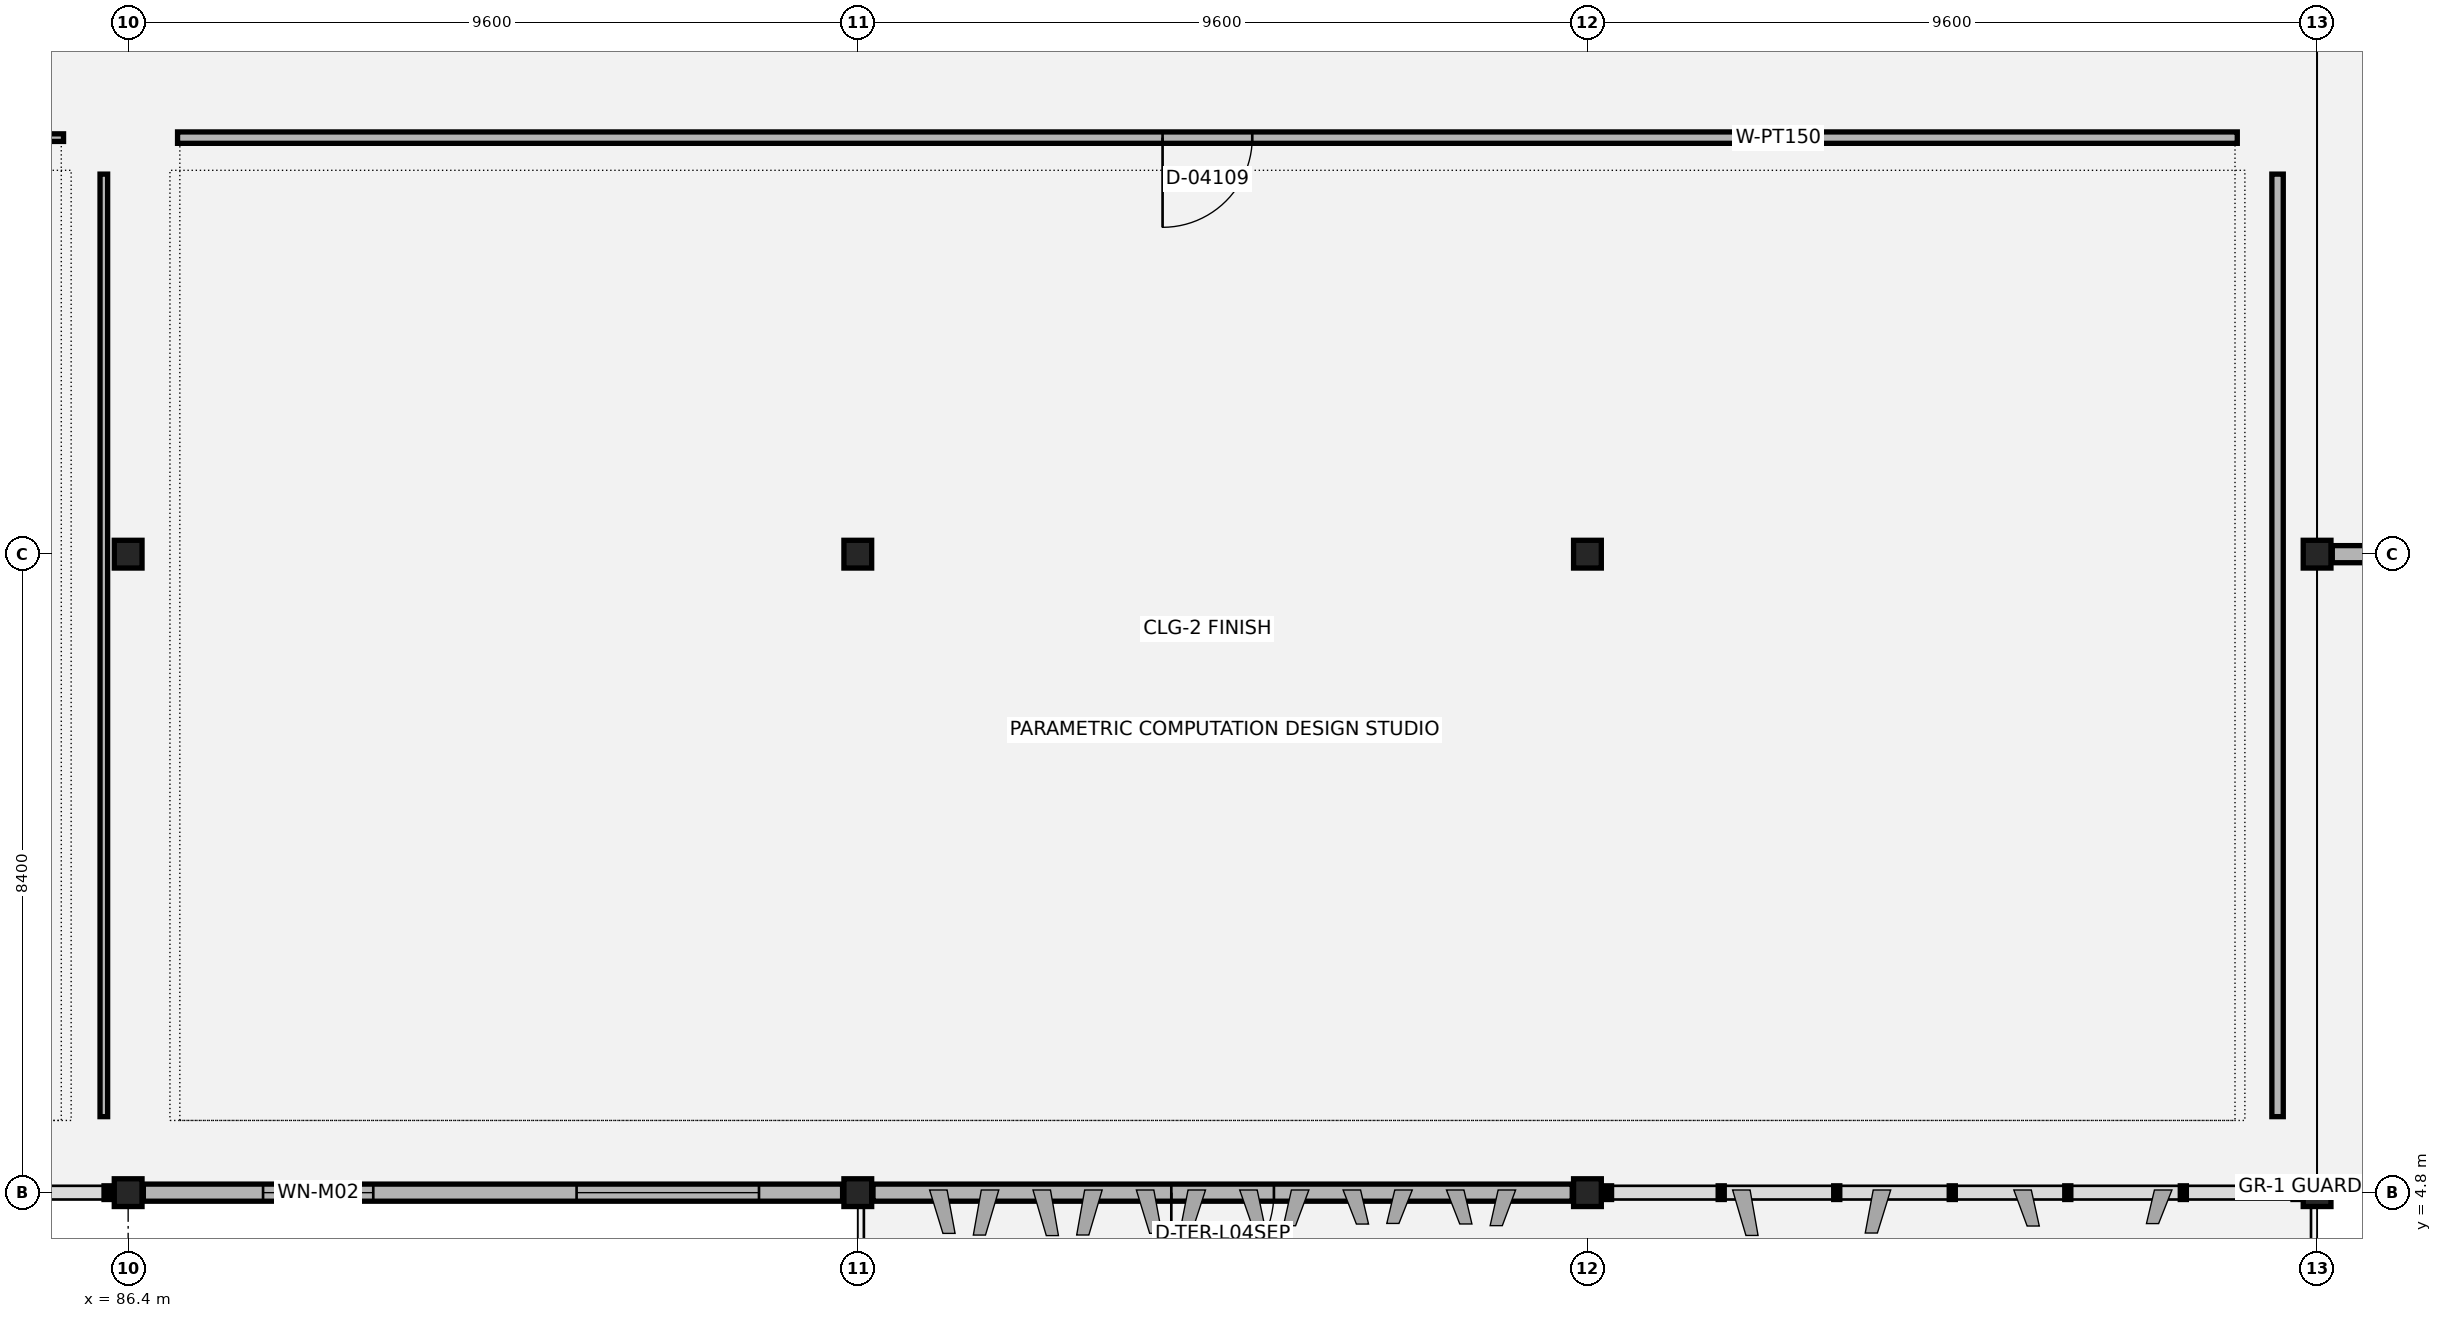
"""IFC4 building model, lengths in metres.
Left out: names, types, materials, properties, quantities, classifications, styles, units other than length and angle.
Written with IfcOpenShell. Run it as: python <this file> out.ifc"""

import sys

from ifc_helpers import new_model, si_unit, direction, frame, frame_2d, origin, origin_2d, place, context, subcontext, project, spatial, rectangle, extrude, element, fill, save


model = new_model("IFC4")
c1 = context("Model", 3, precision=1e-05, world=origin(), true_north=direction((0.0, 1.0)))
c2 = subcontext(c1, "Body", "Model", "MODEL_VIEW")
j1 = project(units=[si_unit("LENGTHUNIT", "METRE"), si_unit("PLANEANGLEUNIT", "RADIAN")], contexts=[c1])
p1 = place(None, origin())
s1 = spatial("IfcSite", under=j1, at=p1, CompositionType="ELEMENT")
p2 = place(p1, origin())
s2 = spatial("IfcBuilding", under=s1, at=p2, CompositionType="ELEMENT")
p3 = place(p2, frame((0.0, 0.0, 18.6)))
s3 = spatial("IfcBuildingStorey", under=s2, at=p3, CompositionType="ELEMENT", Elevation=18.6)
for number, where, z_axis, x_axis in (
    (1, (86.4, 4.8, 0.0), (0.0, 0.0, 1.0), (1.0, 0.0, 0.0)),
    (2, (86.4, 13.2, 0.0), (0.0, 0.0, 1.0), (1.0, 0.0, 0.0)),
    (3, (96.0, 4.8, 0.0), (0.0, 0.0, 1.0), (1.0, 0.0, 0.0)),
    (4, (96.0, 13.2, 0.0), (0.0, 0.0, 1.0), (1.0, 0.0, 0.0)),
    (5, (105.6, 4.8, 0.0), (0.0, 0.0, 1.0), (1.0, 0.0, 0.0)),
    (6, (105.6, 13.2, 0.0), (0.0, 0.0, 1.0), (1.0, 0.0, 0.0)),
    (7, (115.2, 4.8, 0.0), (0.0, 0.0, 1.0), (1.0, 0.0, 0.0)),
    (8, (115.2, 13.2, 0.0), (0.0, 0.0, 1.0), (1.0, 0.0, 0.0)),
):
    element("IfcColumn", number, at=place(p3, frame(where, z_axis=z_axis, x_axis=x_axis)), inside=s3, PredefinedType="COLUMN", context=c2, shape_type="SweptSolid", body=[
        extrude(rectangle(XDim=0.365, YDim=0.365, at=origin_2d()), origin(), (0.0, 0.0, 1.0), 4.2),
    ])
p4 = place(p3, frame((86.6, 4.8, 0.0), z_axis=(0.0, 0.0, 1.0), x_axis=(1.0, 0.0, 0.0)))
e9 = element("IfcWall", 9, at=p4, inside=s3, PredefinedType="SOLIDWALL", context=c2, shape_type="SweptSolid", body=[
    extrude(rectangle(XDim=9.2, YDim=0.225, at=frame_2d((4.6, 0.0))), origin(), (0.0, 0.0, 1.0), 3.07),
])
p5 = place(p4, frame((1.575, 0.0, 0.9)))
e10 = element("IfcOpeningElement", 10, at=p5, cuts=e9, PredefinedType="OPENING", context=c2, shape_type="SweptSolid", body=[
    extrude(rectangle(XDim=1.45, YDim=1.45, at=frame_2d((0.725, 0.725))), frame((0.0, 0.123, 0.0), z_axis=(0.0, -1.0, 0.0), x_axis=(1.0, 0.0, 0.0)), (0.0, 0.0, 1.0), 0.245),
])
p6 = place(p4, frame((5.7, 0.0, 0.9)))
e11 = element("IfcOpeningElement", 11, at=p6, cuts=e9, PredefinedType="OPENING", context=c2, shape_type="SweptSolid", body=[
    extrude(rectangle(XDim=2.4, YDim=1.6, at=frame_2d((1.2, 0.8))), frame((0.0, 0.123, 0.0), z_axis=(0.0, -1.0, 0.0), x_axis=(1.0, 0.0, 0.0)), (0.0, 0.0, 1.0), 0.245),
])
p7 = place(p3, frame((96.2, 4.8, 0.0), z_axis=(0.0, 0.0, 1.0), x_axis=(1.0, 0.0, 0.0)))
e12 = element("IfcWall", 12, at=p7, inside=s3, PredefinedType="SOLIDWALL", context=c2, shape_type="SweptSolid", body=[
    extrude(rectangle(XDim=9.2, YDim=0.225, at=frame_2d((4.6, 0.0))), origin(), (0.0, 0.0, 1.0), 3.07),
])
p8 = place(p7, frame((3.925, 0.0, 0.0)))
e13 = element("IfcOpeningElement", 13, at=p8, cuts=e12, PredefinedType="OPENING", context=c2, shape_type="SweptSolid", body=[
    extrude(rectangle(XDim=1.35, YDim=2.15, at=frame_2d((0.675, 1.075))), frame((0.0, 0.123, 0.0), z_axis=(0.0, -1.0, 0.0), x_axis=(1.0, 0.0, 0.0)), (0.0, 0.0, 1.0), 0.245),
])
p9 = place(p3, frame((119.8, 13.2, 0.0), z_axis=(0.0, 0.0, 1.0), x_axis=(-1.0, 0.0, 0.0)))
e14 = element("IfcWall", 14, at=p9, inside=s3, PredefinedType="SOLIDWALL", context=c2, shape_type="SweptSolid", body=[
    extrude(rectangle(XDim=4.4, YDim=0.225, at=frame_2d((2.2, 0.0))), origin(), (0.0, 0.0, 1.0), 3.07),
])
p10 = place(p9, frame((1.6, 0.0, 0.0)))
e15 = element("IfcOpeningElement", 15, at=p10, cuts=e14, PredefinedType="OPENING", context=c2, shape_type="SweptSolid", body=[
    extrude(rectangle(XDim=1.2, YDim=2.15, at=frame_2d((0.6, 1.075))), frame((0.0, 0.123, 0.0), z_axis=(0.0, -1.0, 0.0), x_axis=(1.0, 0.0, 0.0)), (0.0, 0.0, 1.0), 0.245),
])
p11 = place(p3, frame((58.65, 18.68, 0.0), z_axis=(0.0, 0.0, 1.0), x_axis=(1.0, 0.0, 0.0)))
e16 = element("IfcWall", 16, at=p11, inside=s3, PredefinedType="MOVABLE", context=c2, shape_type="SweptSolid", body=[
    extrude(rectangle(XDim=26.9, YDim=0.1, at=frame_2d((13.45, 0.0))), origin(), (0.0, 0.0, 1.0), 3.05),
])
p12 = place(p11, frame((12.89, 0.0, 0.0)))
e17 = element("IfcOpeningElement", 17, at=p12, cuts=e16, PredefinedType="OPENING", context=c2, shape_type="SweptSolid", body=[
    extrude(rectangle(XDim=1.12, YDim=2.15, at=frame_2d((0.56, 1.075))), frame((0.0, 0.06, 0.0), z_axis=(0.0, -1.0, 0.0), x_axis=(1.0, 0.0, 0.0)), (0.0, 0.0, 1.0), 0.12),
])
p13 = place(p3, frame((86.08, 5.8, 0.0), z_axis=(0.0, 0.0, 1.0), x_axis=(0.0, 1.0, 0.0)))
e18 = element("IfcWall", 18, at=p13, inside=s3, PredefinedType="MOVABLE", context=c2, shape_type="SweptSolid", body=[
    extrude(rectangle(XDim=12.4, YDim=0.1, at=frame_2d((6.2, 0.0))), origin(), (0.0, 0.0, 1.0), 3.05),
])
p14 = place(p3, frame((87.05, 18.68, 0.0), z_axis=(0.0, 0.0, 1.0), x_axis=(1.0, 0.0, 0.0)))
e19 = element("IfcWall", 19, at=p14, inside=s3, PredefinedType="PARTITIONING", context=c2, shape_type="SweptSolid", body=[
    extrude(rectangle(XDim=27.1, YDim=0.15, at=frame_2d((13.55, 0.0))), origin(), (0.0, 0.0, 1.0), 3.05),
])
p15 = place(p14, frame((12.96, 0.0, 0.0)))
e20 = element("IfcOpeningElement", 20, at=p15, cuts=e19, PredefinedType="OPENING", context=c2, shape_type="SweptSolid", body=[
    extrude(rectangle(XDim=1.18, YDim=2.15, at=frame_2d((0.59, 1.075))), frame((0.0, 0.085, 0.0), z_axis=(0.0, -1.0, 0.0), x_axis=(1.0, 0.0, 0.0)), (0.0, 0.0, 1.0), 0.17),
])
p16 = place(p3, frame((114.68, 5.8, 0.0), z_axis=(0.0, 0.0, 1.0), x_axis=(0.0, 1.0, 0.0)))
e21 = element("IfcWall", 21, at=p16, inside=s3, PredefinedType="PARTITIONING", context=c2, shape_type="SweptSolid", body=[
    extrude(rectangle(XDim=12.4, YDim=0.15, at=frame_2d((6.2, 0.0))), origin(), (0.0, 0.0, 1.0), 3.05),
])
p17 = place(p5, origin())
e22 = element("IfcWindow", 22, at=p17, inside=s3, PartitioningType="SINGLE_PANEL", PredefinedType="WINDOW", context=c2, shape_type="SweptSolid", body=[
    extrude(rectangle(XDim=1.45, YDim=1.45, at=frame_2d((0.725, 0.725))), frame((0.0, 0.03, 0.0), z_axis=(0.0, -1.0, 0.0), x_axis=(1.0, 0.0, 0.0)), (0.0, 0.0, 1.0), 0.06),
])
fill(e10, e22)
p18 = place(p6, origin())
e23 = element("IfcWindow", 23, at=p18, inside=s3, PartitioningType="SINGLE_PANEL", PredefinedType="WINDOW", context=c2, shape_type="SweptSolid", body=[
    extrude(rectangle(XDim=2.4, YDim=1.6, at=frame_2d((1.2, 0.8))), frame((0.0, 0.03, 0.0), z_axis=(0.0, -1.0, 0.0), x_axis=(1.0, 0.0, 0.0)), (0.0, 0.0, 1.0), 0.06),
])
fill(e11, e23)
p19 = place(p8, origin())
e24 = element("IfcDoor", 24, at=p19, inside=s3, OperationType="SINGLE_SWING_RIGHT", PredefinedType="DOOR", context=c2, shape_type="SweptSolid", body=[
    extrude(rectangle(XDim=1.35, YDim=2.15, at=frame_2d((0.675, 1.075))), frame((0.0, 0.025, 0.0), z_axis=(0.0, -1.0, 0.0), x_axis=(1.0, 0.0, 0.0)), (0.0, 0.0, 1.0), 0.05),
])
fill(e13, e24)
p20 = place(p15, origin())
e25 = element("IfcDoor", 25, at=p20, inside=s3, OperationType="SINGLE_SWING_RIGHT", PredefinedType="DOOR", context=c2, shape_type="SweptSolid", body=[
    extrude(rectangle(XDim=1.18, YDim=2.15, at=frame_2d((0.59, 1.075))), frame((0.0, 0.025, 0.0), z_axis=(0.0, -1.0, 0.0), x_axis=(1.0, 0.0, 0.0)), (0.0, 0.0, 1.0), 0.05),
])
fill(e20, e25)
save(model, sys.argv[1])
